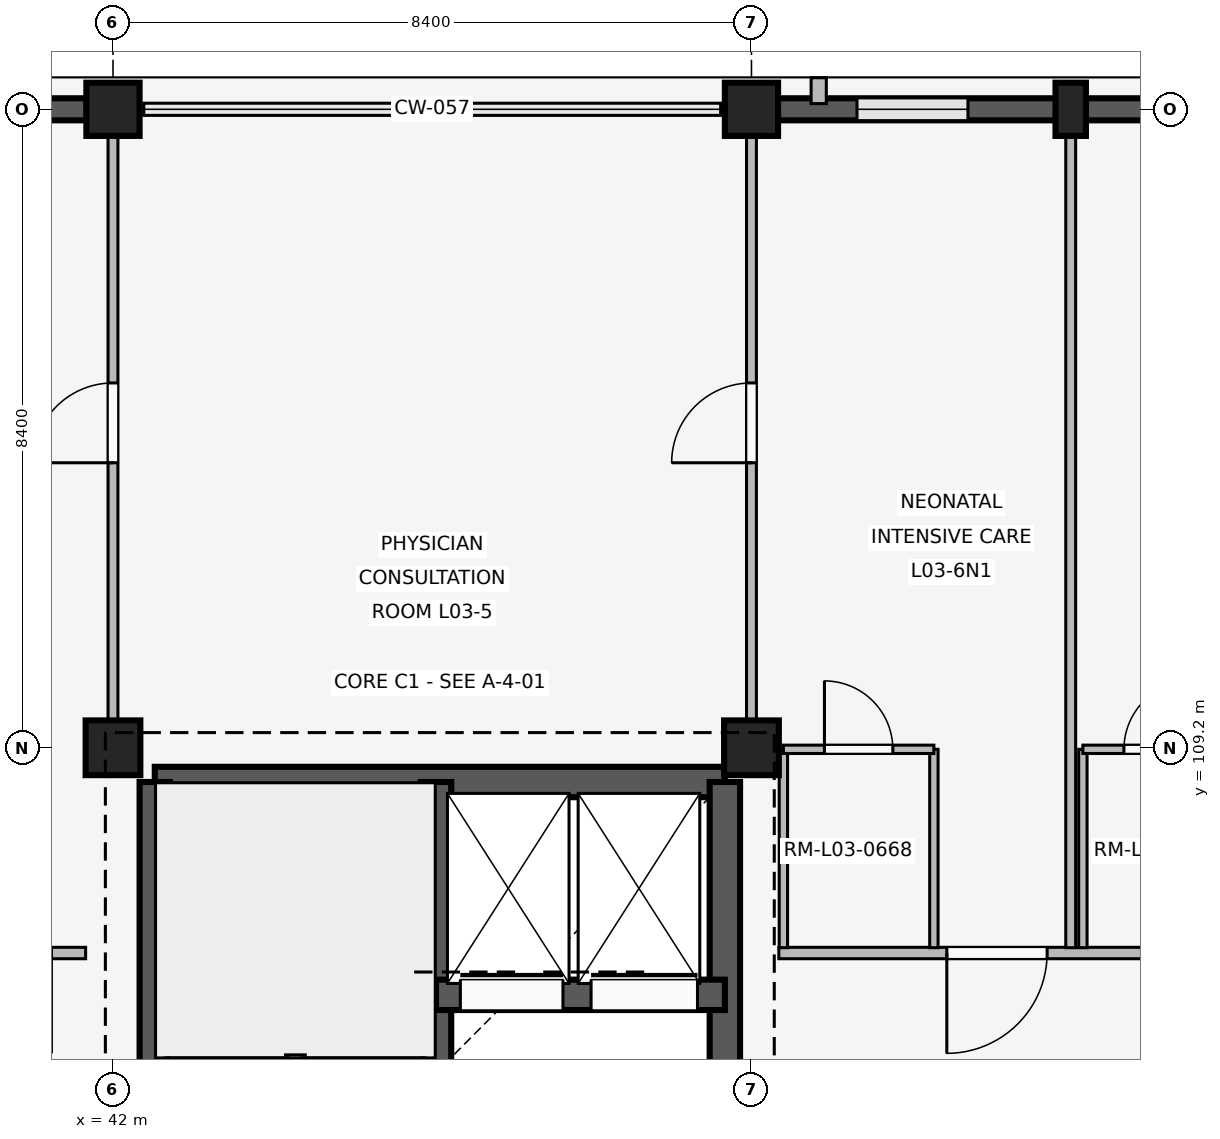
"""IFC4 building model, lengths in metres.
Left out: names, types, materials, properties, quantities, classifications, styles, units other than length and angle.
Written with IfcOpenShell. Run it as: python <this file> out.ifc"""

import sys

from ifc_helpers import new_model, si_unit, direction, frame, frame_2d, origin, origin_2d, place, context, subcontext, project, spatial, rectangle, extrude, element, fill, save


model = new_model("IFC4")
c1 = context("Model", 3, precision=1e-05, world=origin(), true_north=direction((0.0, 1.0)))
c2 = subcontext(c1, "Body", "Model", "MODEL_VIEW")
j1 = project(units=[si_unit("LENGTHUNIT", "METRE"), si_unit("PLANEANGLEUNIT", "RADIAN")], contexts=[c1])
p1 = place(None, origin())
s1 = spatial("IfcSite", under=j1, at=p1, CompositionType="ELEMENT")
p2 = place(p1, origin())
s2 = spatial("IfcBuilding", under=s1, at=p2, CompositionType="ELEMENT")
p3 = place(p2, frame((0.0, 0.0, 12.9)))
s3 = spatial("IfcBuildingStorey", under=s2, at=p3, CompositionType="ELEMENT", Elevation=12.9)
p4 = place(p3, frame((42.0, 109.2, 0.0), z_axis=(0.0, 0.0, 1.0), x_axis=(1.0, 0.0, 0.0)))
e1 = element("IfcColumn", 1, at=p4, inside=s3, PredefinedType="COLUMN", context=c2, shape_type="SweptSolid", body=[
    extrude(rectangle(XDim=0.72, YDim=0.72, at=origin_2d()), origin(), (0.0, 0.0, 1.0), 3.3),
])
p5 = place(p3, frame((42.0, 117.6, 0.0), z_axis=(0.0, 0.0, 1.0), x_axis=(1.0, 0.0, 0.0)))
e2 = element("IfcColumn", 2, at=p5, inside=s3, PredefinedType="COLUMN", context=c2, shape_type="SweptSolid", body=[
    extrude(rectangle(XDim=0.7, YDim=0.7, at=origin_2d()), origin(), (0.0, 0.0, 1.0), 3.3),
])
p6 = place(p3, frame((50.4, 109.2, 0.0), z_axis=(0.0, 0.0, 1.0), x_axis=(1.0, 0.0, 0.0)))
e3 = element("IfcColumn", 3, at=p6, inside=s3, PredefinedType="COLUMN", context=c2, shape_type="SweptSolid", body=[
    extrude(rectangle(XDim=0.72, YDim=0.72, at=origin_2d()), origin(), (0.0, 0.0, 1.0), 3.3),
])
p7 = place(p3, frame((50.4, 117.6, 0.0), z_axis=(0.0, 0.0, 1.0), x_axis=(1.0, 0.0, 0.0)))
e4 = element("IfcColumn", 4, at=p7, inside=s3, PredefinedType="COLUMN", context=c2, shape_type="SweptSolid", body=[
    extrude(rectangle(XDim=0.7, YDim=0.7, at=origin_2d()), origin(), (0.0, 0.0, 1.0), 3.3),
])
p8 = place(p3, frame((54.6, 117.6, 0.0), z_axis=(0.0, 0.0, 1.0), x_axis=(1.0, 0.0, 0.0)))
e5 = element("IfcColumn", 5, at=p8, inside=s3, PredefinedType="PILASTER", context=c2, shape_type="SweptSolid", body=[
    extrude(rectangle(XDim=0.4, YDim=0.7, at=origin_2d()), origin(), (0.0, 0.0, 1.0), 3.3),
])
p9 = place(p3, frame((33.945, 117.6, 0.0), z_axis=(0.0, 0.0, 1.0), x_axis=(1.0, 0.0, 0.0)))
e6 = element("IfcWall", 6, at=p9, inside=s3, PredefinedType="SOLIDWALL", context=c2, shape_type="SweptSolid", body=[
    extrude(rectangle(XDim=7.71, YDim=0.29, at=frame_2d((3.855, 0.0))), origin(), (0.0, 0.0, 1.0), 2.44),
])
p10 = place(p9, frame((1.043, 0.0, 0.85)))
e7 = element("IfcOpeningElement", 7, at=p10, cuts=e6, PredefinedType="OPENING", context=c2, shape_type="SweptSolid", body=[
    extrude(rectangle(XDim=1.46, YDim=0.85, at=frame_2d((0.73, 0.425))), frame((0.0, 0.155, 0.0), z_axis=(0.0, -1.0, 0.0), x_axis=(1.0, 0.0, 0.0)), (0.0, 0.0, 1.0), 0.31),
])
p11 = place(p9, frame((5.207, 0.0, 0.85)))
e8 = element("IfcOpeningElement", 8, at=p11, cuts=e6, PredefinedType="OPENING", context=c2, shape_type="SweptSolid", body=[
    extrude(rectangle(XDim=1.46, YDim=0.85, at=frame_2d((0.73, 0.425))), frame((0.0, 0.155, 0.0), z_axis=(0.0, -1.0, 0.0), x_axis=(1.0, 0.0, 0.0)), (0.0, 0.0, 1.0), 0.31),
])
p12 = place(p3, frame((50.745, 117.6, 0.0), z_axis=(0.0, 0.0, 1.0), x_axis=(1.0, 0.0, 0.0)))
e9 = element("IfcWall", 9, at=p12, inside=s3, PredefinedType="SOLIDWALL", context=c2, shape_type="SweptSolid", body=[
    extrude(rectangle(XDim=7.71, YDim=0.29, at=frame_2d((3.855, 0.0))), origin(), (0.0, 0.0, 1.0), 2.44),
])
p13 = place(p12, frame((1.043, 0.0, 0.85)))
e10 = element("IfcOpeningElement", 10, at=p13, cuts=e9, PredefinedType="OPENING", context=c2, shape_type="SweptSolid", body=[
    extrude(rectangle(XDim=1.46, YDim=0.85, at=frame_2d((0.73, 0.425))), frame((0.0, 0.155, 0.0), z_axis=(0.0, -1.0, 0.0), x_axis=(1.0, 0.0, 0.0)), (0.0, 0.0, 1.0), 0.31),
])
p14 = place(p12, frame((5.207, 0.0, 0.85)))
e11 = element("IfcOpeningElement", 11, at=p14, cuts=e9, PredefinedType="OPENING", context=c2, shape_type="SweptSolid", body=[
    extrude(rectangle(XDim=1.46, YDim=0.85, at=frame_2d((0.73, 0.425))), frame((0.0, 0.155, 0.0), z_axis=(0.0, -1.0, 0.0), x_axis=(1.0, 0.0, 0.0)), (0.0, 0.0, 1.0), 0.31),
])
p15 = place(p3, frame((51.285, 117.675, 0.0), z_axis=(0.0, 0.0, 1.0), x_axis=(0.0, 1.0, 0.0)))
e12 = element("IfcWall", 12, at=p15, inside=s3, PredefinedType="ELEMENTEDWALL", context=c2, shape_type="SweptSolid", body=[
    extrude(rectangle(XDim=0.34, YDim=0.2, at=frame_2d((0.17, 0.0))), origin(), (0.0, 0.0, 1.0), 2.42),
])
p16 = place(p3, frame((42.55, 108.75, 0.0), z_axis=(0.0, 0.0, 1.0), x_axis=(1.0, 0.0, 0.0)))
e13 = element("IfcWall", 13, at=p16, inside=s3, PredefinedType="SHEAR", context=c2, shape_type="SweptSolid", body=[
    extrude(rectangle(XDim=7.5, YDim=0.4, at=frame_2d((3.75, 0.0))), origin(), (0.0, 0.0, 1.0), 3.02),
])
p17 = place(p3, frame((42.55, 101.2, 0.0), z_axis=(0.0, 0.0, 1.0), x_axis=(0.0, 1.0, 0.0)))
e14 = element("IfcWall", 14, at=p17, inside=s3, PredefinedType="SHEAR", context=c2, shape_type="SweptSolid", body=[
    extrude(rectangle(XDim=7.55, YDim=0.4, at=frame_2d((3.775, 0.0))), origin(), (0.0, 0.0, 1.0), 3.02),
])
p18 = place(p17, frame((0.28, 0.0, 0.0)))
e15 = element("IfcOpeningElement", 15, at=p18, cuts=e14, PredefinedType="OPENING", context=c2, shape_type="SweptSolid", body=[
    extrude(rectangle(XDim=1.0, YDim=2.15, at=frame_2d((0.5, 1.075))), frame((0.0, 0.21, 0.0), z_axis=(0.0, -1.0, 0.0), x_axis=(1.0, 0.0, 0.0)), (0.0, 0.0, 1.0), 0.42),
])
p19 = place(p3, frame((50.05, 101.2, 0.0), z_axis=(0.0, 0.0, 1.0), x_axis=(0.0, 1.0, 0.0)))
e16 = element("IfcWall", 16, at=p19, inside=s3, PredefinedType="SHEAR", context=c2, shape_type="SweptSolid", body=[
    extrude(rectangle(XDim=7.55, YDim=0.4, at=frame_2d((3.775, 0.0))), origin(), (0.0, 0.0, 1.0), 3.02),
])
p20 = place(p19, frame((2.4, 0.0, 0.0)))
e17 = element("IfcOpeningElement", 17, at=p20, cuts=e16, PredefinedType="OPENING", context=c2, shape_type="SweptSolid", body=[
    extrude(rectangle(XDim=1.2, YDim=2.2, at=frame_2d((0.6, 1.1))), frame((0.0, 0.21, 0.0), z_axis=(0.0, -1.0, 0.0), x_axis=(1.0, 0.0, 0.0)), (0.0, 0.0, 1.0), 0.42),
])
p21 = place(p3, frame((46.25, 101.2, 0.0), z_axis=(0.0, 0.0, 1.0), x_axis=(0.0, 1.0, 0.0)))
e18 = element("IfcWall", 18, at=p21, inside=s3, PredefinedType="SHEAR", context=c2, shape_type="SweptSolid", body=[
    extrude(rectangle(XDim=7.55, YDim=0.4, at=frame_2d((3.775, 0.0))), origin(), (0.0, 0.0, 1.0), 3.02),
])
p22 = place(p21, frame((0.28, 0.0, 0.0)))
e19 = element("IfcOpeningElement", 19, at=p22, cuts=e18, PredefinedType="OPENING", context=c2, shape_type="SweptSolid", body=[
    extrude(rectangle(XDim=1.0, YDim=2.15, at=frame_2d((0.5, 1.075))), frame((0.0, 0.21, 0.0), z_axis=(0.0, -1.0, 0.0), x_axis=(1.0, 0.0, 0.0)), (0.0, 0.0, 1.0), 0.42),
])
p23 = place(p3, frame((46.25, 105.95, 0.0), z_axis=(0.0, 0.0, 1.0), x_axis=(1.0, 0.0, 0.0)))
e20 = element("IfcWall", 20, at=p23, inside=s3, PredefinedType="SHEAR", context=c2, shape_type="SweptSolid", body=[
    extrude(rectangle(XDim=3.8, YDim=0.4, at=frame_2d((1.9, 0.0))), origin(), (0.0, 0.0, 1.0), 3.02),
])
p24 = place(p23, frame((0.32, 0.0, 0.0)))
e21 = element("IfcOpeningElement", 21, at=p24, cuts=e20, PredefinedType="OPENING", context=c2, shape_type="SweptSolid", body=[
    extrude(rectangle(XDim=1.35, YDim=2.25, at=frame_2d((0.675, 1.125))), frame((0.0, 0.21, 0.0), z_axis=(0.0, -1.0, 0.0), x_axis=(1.0, 0.0, 0.0)), (0.0, 0.0, 1.0), 0.42),
])
p25 = place(p23, frame((2.04, 0.0, 0.0)))
e22 = element("IfcOpeningElement", 22, at=p25, cuts=e20, PredefinedType="OPENING", context=c2, shape_type="SweptSolid", body=[
    extrude(rectangle(XDim=1.4, YDim=2.25, at=frame_2d((0.7, 1.125))), frame((0.0, 0.21, 0.0), z_axis=(0.0, -1.0, 0.0), x_axis=(1.0, 0.0, 0.0)), (0.0, 0.0, 1.0), 0.42),
])
p26 = place(p3, frame((41.64, 106.5, 0.0), z_axis=(0.0, 0.0, 1.0), x_axis=(-1.0, 0.0, 0.0)))
e23 = element("IfcWall", 23, at=p26, inside=s3, PredefinedType="PARTITIONING", context=c2, shape_type="SweptSolid", body=[
    extrude(rectangle(XDim=7.96, YDim=0.15, at=frame_2d((3.98, 0.0))), origin(), (0.0, 0.0, 1.0), 2.42),
])
p27 = place(p26, frame((0.45, 0.0, 0.0)))
e24 = element("IfcOpeningElement", 24, at=p27, cuts=e23, PredefinedType="OPENING", context=c2, shape_type="SweptSolid", body=[
    extrude(rectangle(XDim=1.32, YDim=2.25, at=frame_2d((0.66, 1.125))), frame((0.0, 0.085, 0.0), z_axis=(0.0, -1.0, 0.0), x_axis=(1.0, 0.0, 0.0)), (0.0, 0.0, 1.0), 0.17),
])
p28 = place(p26, frame((4.15, 0.0, 0.0)))
e25 = element("IfcOpeningElement", 25, at=p28, cuts=e23, PredefinedType="OPENING", context=c2, shape_type="SweptSolid", body=[
    extrude(rectangle(XDim=1.32, YDim=2.25, at=frame_2d((0.66, 1.125))), frame((0.0, 0.085, 0.0), z_axis=(0.0, -1.0, 0.0), x_axis=(1.0, 0.0, 0.0)), (0.0, 0.0, 1.0), 0.17),
])
p29 = place(p3, frame((42.0, 109.55, 0.0), z_axis=(0.0, 0.0, 1.0), x_axis=(0.0, 1.0, 0.0)))
e26 = element("IfcWall", 26, at=p29, inside=s3, PredefinedType="PARTITIONING", context=c2, shape_type="SweptSolid", body=[
    extrude(rectangle(XDim=7.91, YDim=0.13, at=frame_2d((3.955, 0.0))), origin(), (0.0, 0.0, 1.0), 2.42),
])
p30 = place(p29, frame((3.4, 0.0, 0.0)))
e27 = element("IfcOpeningElement", 27, at=p30, cuts=e26, PredefinedType="OPENING", context=c2, shape_type="SweptSolid", body=[
    extrude(rectangle(XDim=1.05, YDim=2.2, at=frame_2d((0.525, 1.1))), frame((0.0, 0.075, 0.0), z_axis=(0.0, -1.0, 0.0), x_axis=(1.0, 0.0, 0.0)), (0.0, 0.0, 1.0), 0.15),
])
p31 = place(p3, frame((50.4, 109.55, 0.0), z_axis=(0.0, 0.0, 1.0), x_axis=(0.0, 1.0, 0.0)))
e28 = element("IfcWall", 28, at=p31, inside=s3, PredefinedType="PARTITIONING", context=c2, shape_type="SweptSolid", body=[
    extrude(rectangle(XDim=7.91, YDim=0.13, at=frame_2d((3.955, 0.0))), origin(), (0.0, 0.0, 1.0), 2.42),
])
p32 = place(p31, frame((3.4, 0.0, 0.0)))
e29 = element("IfcOpeningElement", 29, at=p32, cuts=e28, PredefinedType="OPENING", context=c2, shape_type="SweptSolid", body=[
    extrude(rectangle(XDim=1.05, YDim=2.2, at=frame_2d((0.525, 1.1))), frame((0.0, 0.075, 0.0), z_axis=(0.0, -1.0, 0.0), x_axis=(1.0, 0.0, 0.0)), (0.0, 0.0, 1.0), 0.15),
])
p33 = place(p3, frame((58.72, 106.5, 0.0), z_axis=(0.0, 0.0, 1.0), x_axis=(-1.0, 0.0, 0.0)))
e30 = element("IfcWall", 30, at=p33, inside=s3, PredefinedType="PARTITIONING", context=c2, shape_type="SweptSolid", body=[
    extrude(rectangle(XDim=7.96, YDim=0.15, at=frame_2d((3.98, 0.0))), origin(), (0.0, 0.0, 1.0), 2.42),
])
p34 = place(p33, frame((0.73, 0.0, 0.0)))
e31 = element("IfcOpeningElement", 31, at=p34, cuts=e30, PredefinedType="OPENING", context=c2, shape_type="SweptSolid", body=[
    extrude(rectangle(XDim=1.32, YDim=2.25, at=frame_2d((0.66, 1.125))), frame((0.0, 0.085, 0.0), z_axis=(0.0, -1.0, 0.0), x_axis=(1.0, 0.0, 0.0)), (0.0, 0.0, 1.0), 0.17),
])
p35 = place(p33, frame((4.43, 0.0, 0.0)))
e32 = element("IfcOpeningElement", 32, at=p35, cuts=e30, PredefinedType="OPENING", context=c2, shape_type="SweptSolid", body=[
    extrude(rectangle(XDim=1.32, YDim=2.25, at=frame_2d((0.66, 1.125))), frame((0.0, 0.085, 0.0), z_axis=(0.0, -1.0, 0.0), x_axis=(1.0, 0.0, 0.0)), (0.0, 0.0, 1.0), 0.17),
])
p36 = place(p3, frame((54.6, 106.57, 0.0), z_axis=(0.0, 0.0, 1.0), x_axis=(0.0, 1.0, 0.0)))
e33 = element("IfcWall", 33, at=p36, inside=s3, PredefinedType="PARTITIONING", context=c2, shape_type="SweptSolid", body=[
    extrude(rectangle(XDim=10.93, YDim=0.13, at=frame_2d((5.465, 0.0))), origin(), (0.0, 0.0, 1.0), 2.42),
])
for number, where, z_axis, x_axis in (
    (34, (50.82, 106.57, 0.0), (0.0, 0.0, 1.0), (0.0, 1.0, 0.0)),
    (35, (52.8, 106.57, 0.0), (0.0, 0.0, 1.0), (0.0, 1.0, 0.0)),
):
    element("IfcWall", number, at=place(p3, frame(where, z_axis=z_axis, x_axis=x_axis)), inside=s3, PredefinedType="PARTITIONING", context=c2, shape_type="SweptSolid", body=[
        extrude(rectangle(XDim=2.61, YDim=0.11, at=frame_2d((1.305, 0.0))), origin(), (0.0, 0.0, 1.0), 2.42),
    ])
p37 = place(p3, frame((50.82, 109.18, 0.0), z_axis=(0.0, 0.0, 1.0), x_axis=(1.0, 0.0, 0.0)))
e36 = element("IfcWall", 36, at=p37, inside=s3, PredefinedType="PARTITIONING", context=c2, shape_type="SweptSolid", body=[
    extrude(rectangle(XDim=1.98, YDim=0.11, at=frame_2d((0.99, 0.0))), origin(), (0.0, 0.0, 1.0), 2.42),
])
p38 = place(p37, frame((0.54, 0.0, 0.0)))
e37 = element("IfcOpeningElement", 37, at=p38, cuts=e36, PredefinedType="OPENING", context=c2, shape_type="SweptSolid", body=[
    extrude(rectangle(XDim=0.9, YDim=2.1, at=frame_2d((0.45, 1.05))), frame((0.0, 0.065, 0.0), z_axis=(0.0, -1.0, 0.0), x_axis=(1.0, 0.0, 0.0)), (0.0, 0.0, 1.0), 0.13),
])
p39 = place(p3, frame((54.76, 106.57, 0.0), z_axis=(0.0, 0.0, 1.0), x_axis=(0.0, 1.0, 0.0)))
e38 = element("IfcWall", 38, at=p39, inside=s3, PredefinedType="PARTITIONING", context=c2, shape_type="SweptSolid", body=[
    extrude(rectangle(XDim=2.61, YDim=0.11, at=frame_2d((1.305, 0.0))), origin(), (0.0, 0.0, 1.0), 2.42),
])
p40 = place(p3, frame((54.76, 109.18, 0.0), z_axis=(0.0, 0.0, 1.0), x_axis=(1.0, 0.0, 0.0)))
e39 = element("IfcWall", 39, at=p40, inside=s3, PredefinedType="PARTITIONING", context=c2, shape_type="SweptSolid", body=[
    extrude(rectangle(XDim=1.98, YDim=0.11, at=frame_2d((0.99, 0.0))), origin(), (0.0, 0.0, 1.0), 2.42),
])
p41 = place(p40, frame((0.54, 0.0, 0.0)))
e40 = element("IfcOpeningElement", 40, at=p41, cuts=e39, PredefinedType="OPENING", context=c2, shape_type="SweptSolid", body=[
    extrude(rectangle(XDim=0.9, YDim=2.1, at=frame_2d((0.45, 1.05))), frame((0.0, 0.065, 0.0), z_axis=(0.0, -1.0, 0.0), x_axis=(1.0, 0.0, 0.0)), (0.0, 0.0, 1.0), 0.13),
])
p42 = place(p13, origin())
e41 = element("IfcWindow", 41, at=p42, inside=s3, PartitioningType="SINGLE_PANEL", PredefinedType="WINDOW", context=c2, shape_type="SweptSolid", body=[
    extrude(rectangle(XDim=1.46, YDim=0.85, at=frame_2d((0.73, 0.425))), frame((0.0, 0.03, 0.0), z_axis=(0.0, -1.0, 0.0), x_axis=(1.0, 0.0, 0.0)), (0.0, 0.0, 1.0), 0.06),
])
fill(e10, e41)
p43 = place(p24, origin())
e42 = element("IfcDoor", 42, at=p43, inside=s3, OperationType="SLIDING_TO_LEFT", PredefinedType="DOOR", context=c2, shape_type="SweptSolid", body=[
    extrude(rectangle(XDim=1.35, YDim=2.25, at=frame_2d((0.675, 1.125))), frame((0.0, 0.025, 0.0), z_axis=(0.0, -1.0, 0.0), x_axis=(1.0, 0.0, 0.0)), (0.0, 0.0, 1.0), 0.05),
])
fill(e21, e42)
p44 = place(p25, origin())
e43 = element("IfcDoor", 43, at=p44, inside=s3, OperationType="SLIDING_TO_LEFT", PredefinedType="DOOR", context=c2, shape_type="SweptSolid", body=[
    extrude(rectangle(XDim=1.4, YDim=2.25, at=frame_2d((0.7, 1.125))), frame((0.0, 0.025, 0.0), z_axis=(0.0, -1.0, 0.0), x_axis=(1.0, 0.0, 0.0)), (0.0, 0.0, 1.0), 0.05),
])
fill(e22, e43)
p45 = place(p30, origin())
e44 = element("IfcDoor", 44, at=p45, inside=s3, OperationType="SINGLE_SWING_LEFT", PredefinedType="DOOR", context=c2, shape_type="SweptSolid", body=[
    extrude(rectangle(XDim=1.05, YDim=2.2, at=frame_2d((0.525, 1.1))), frame((0.0, 0.025, 0.0), z_axis=(0.0, -1.0, 0.0), x_axis=(1.0, 0.0, 0.0)), (0.0, 0.0, 1.0), 0.05),
])
fill(e27, e44)
p46 = place(p32, origin())
e45 = element("IfcDoor", 45, at=p46, inside=s3, OperationType="SINGLE_SWING_LEFT", PredefinedType="DOOR", context=c2, shape_type="SweptSolid", body=[
    extrude(rectangle(XDim=1.05, YDim=2.2, at=frame_2d((0.525, 1.1))), frame((0.0, 0.025, 0.0), z_axis=(0.0, -1.0, 0.0), x_axis=(1.0, 0.0, 0.0)), (0.0, 0.0, 1.0), 0.05),
])
fill(e29, e45)
p47 = place(p35, origin())
e46 = element("IfcDoor", 46, at=p47, inside=s3, OperationType="SINGLE_SWING_RIGHT", PredefinedType="DOOR", context=c2, shape_type="SweptSolid", body=[
    extrude(rectangle(XDim=1.32, YDim=2.25, at=frame_2d((0.66, 1.125))), frame((0.0, 0.025, 0.0), z_axis=(0.0, -1.0, 0.0), x_axis=(1.0, 0.0, 0.0)), (0.0, 0.0, 1.0), 0.05),
])
fill(e32, e46)
p48 = place(p38, origin())
e47 = element("IfcDoor", 47, at=p48, inside=s3, OperationType="SINGLE_SWING_LEFT", PredefinedType="DOOR", context=c2, shape_type="SweptSolid", body=[
    extrude(rectangle(XDim=0.9, YDim=2.1, at=frame_2d((0.45, 1.05))), frame((0.0, 0.025, 0.0), z_axis=(0.0, -1.0, 0.0), x_axis=(1.0, 0.0, 0.0)), (0.0, 0.0, 1.0), 0.05),
])
fill(e37, e47)
p49 = place(p41, origin())
e48 = element("IfcDoor", 48, at=p49, inside=s3, OperationType="SINGLE_SWING_RIGHT", PredefinedType="DOOR", context=c2, shape_type="SweptSolid", body=[
    extrude(rectangle(XDim=0.9, YDim=2.1, at=frame_2d((0.45, 1.05))), frame((0.0, 0.025, 0.0), z_axis=(0.0, -1.0, 0.0), x_axis=(1.0, 0.0, 0.0)), (0.0, 0.0, 1.0), 0.05),
])
fill(e40, e48)
save(model, sys.argv[1])
